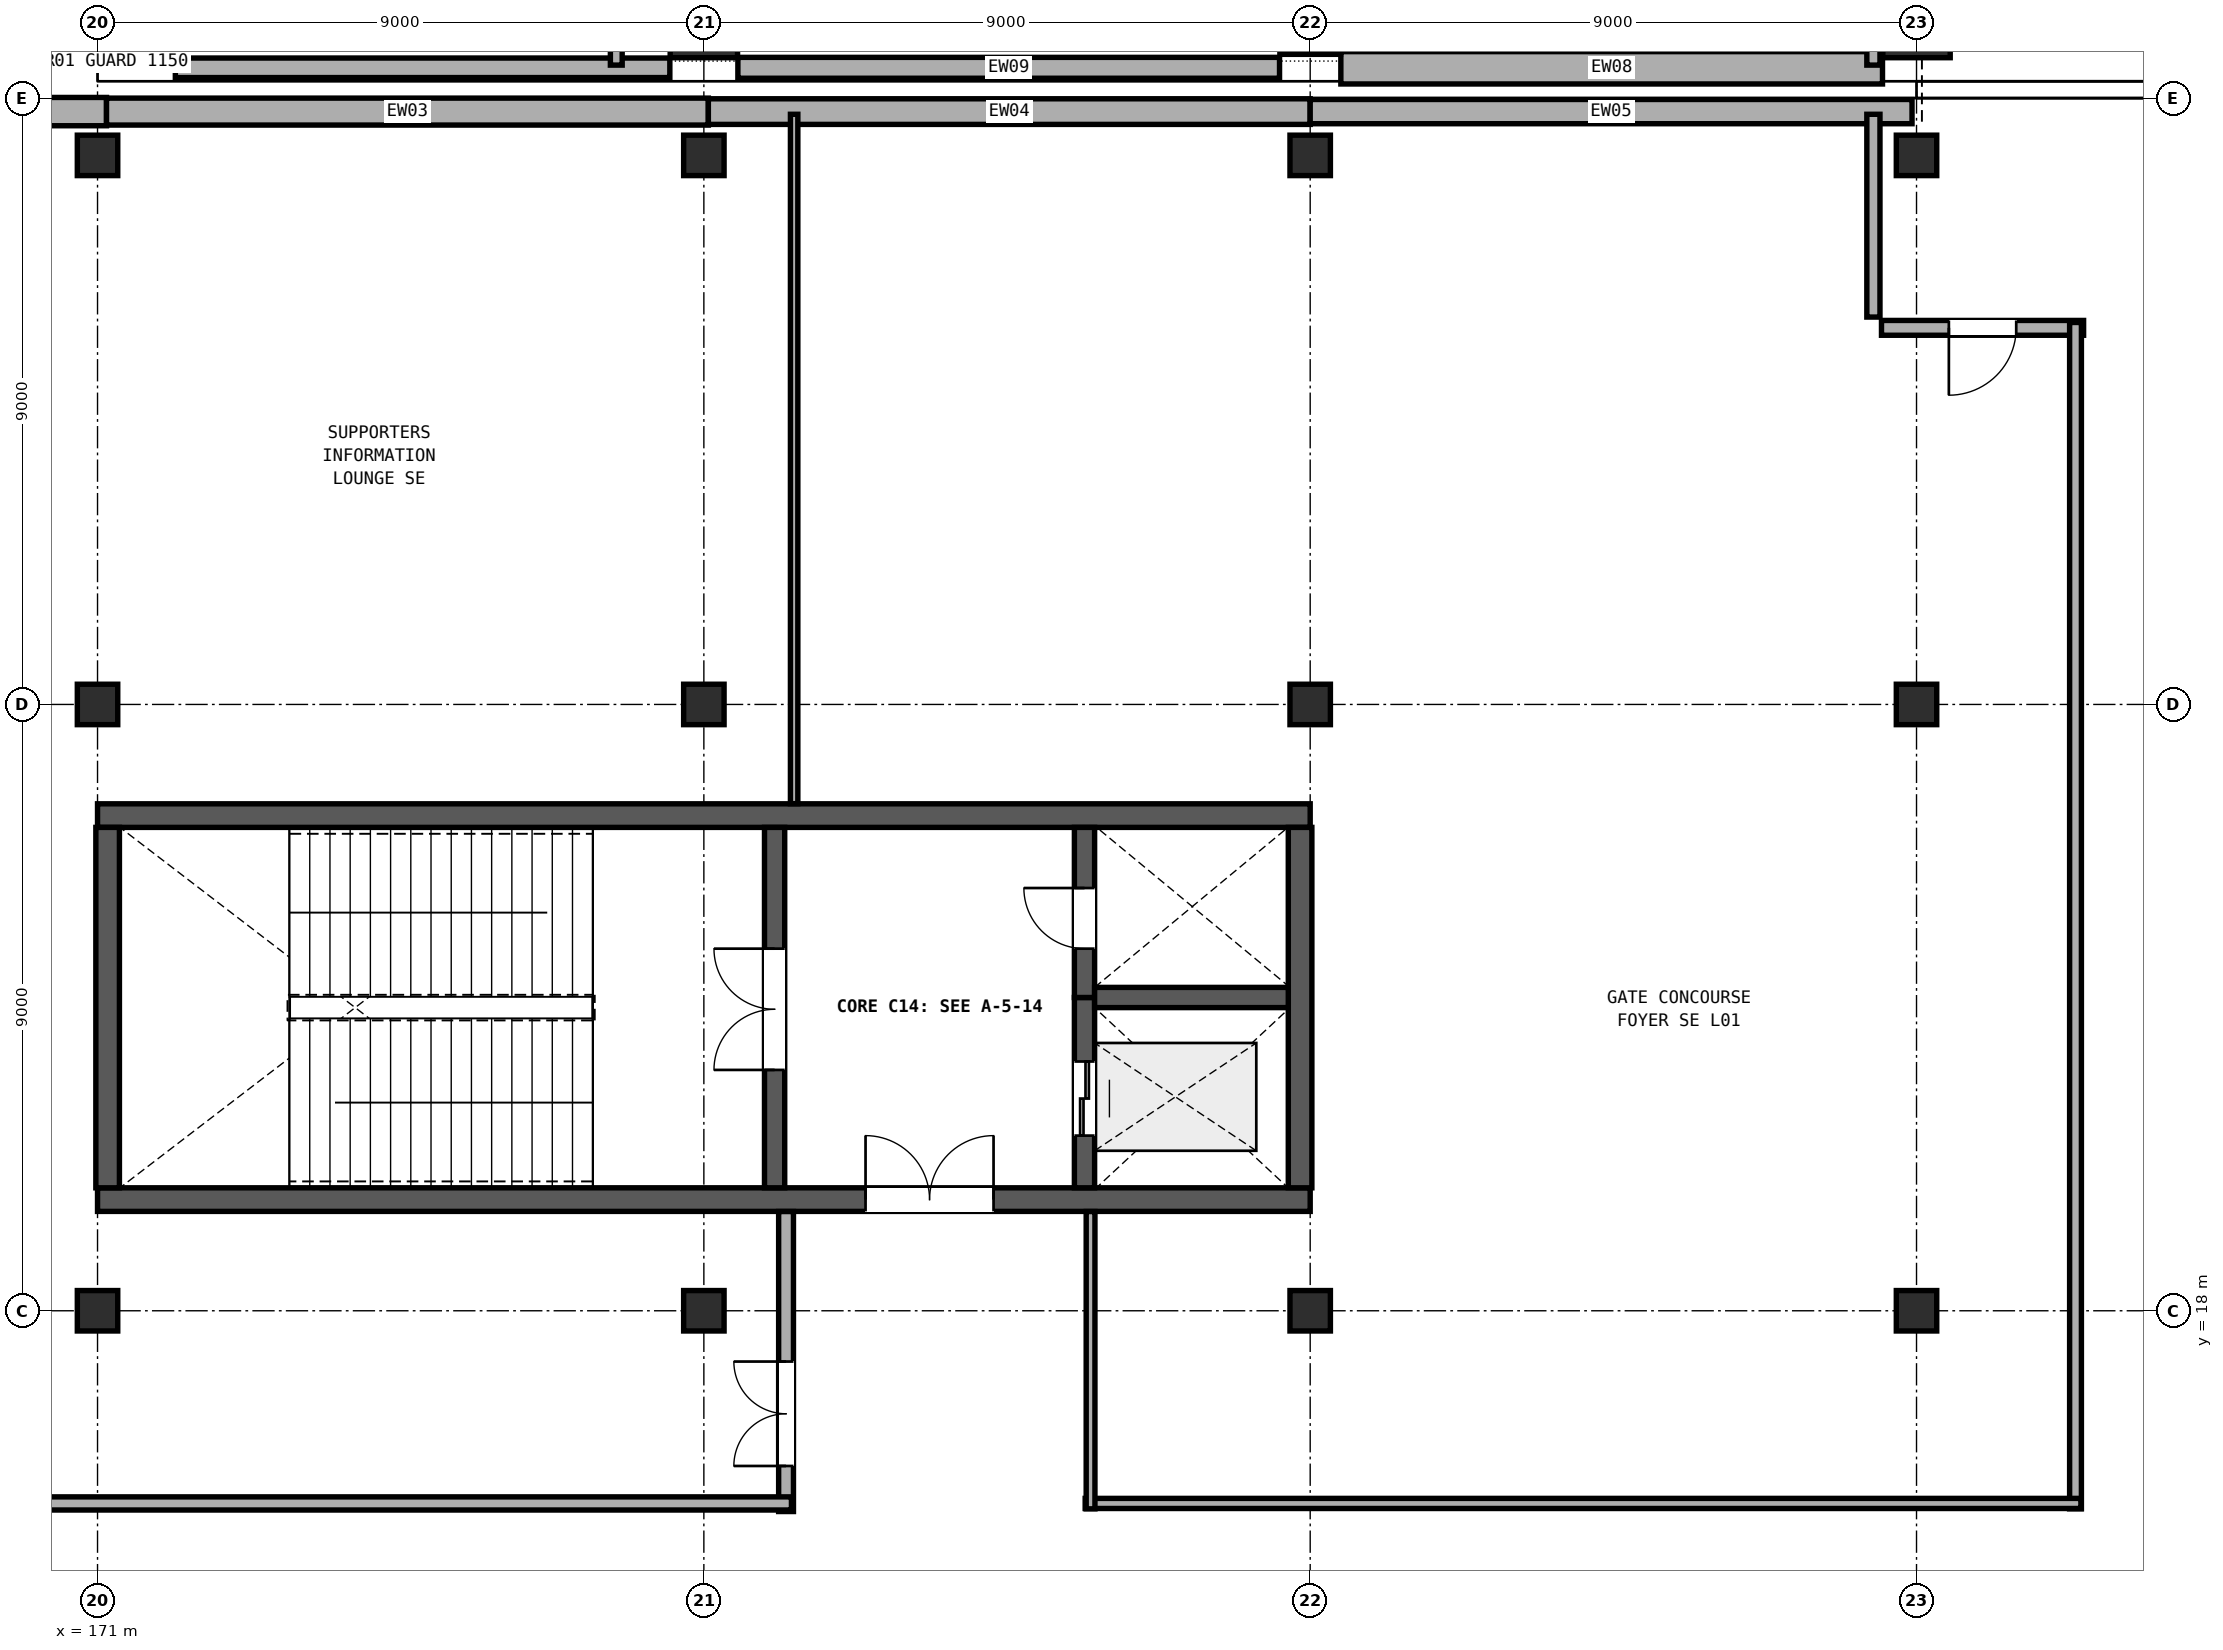
"""IFC4 building model, lengths in metres.
Left out: names, types, materials, properties, quantities, classifications, styles, units other than length and angle.
Written with IfcOpenShell. Run it as: python <this file> out.ifc"""

import sys

from ifc_helpers import new_model, si_unit, direction, frame, frame_2d, origin, origin_2d, place, context, subcontext, project, spatial, rectangle, extrude, element, fill, save


model = new_model("IFC4")
c1 = context("Model", 3, precision=1e-05, world=origin(), true_north=direction((0.0, 1.0)))
c2 = subcontext(c1, "Body", "Model", "MODEL_VIEW")
j1 = project(units=[si_unit("LENGTHUNIT", "METRE"), si_unit("PLANEANGLEUNIT", "RADIAN")], contexts=[c1])
p1 = place(None, origin())
s1 = spatial("IfcSite", under=j1, at=p1, CompositionType="ELEMENT")
p2 = place(p1, origin())
s2 = spatial("IfcBuilding", under=s1, at=p2, CompositionType="ELEMENT")
p3 = place(p2, frame((0.0, 0.0, 4.8)))
s3 = spatial("IfcBuildingStorey", under=s2, at=p3, CompositionType="ELEMENT", Elevation=4.8)
p4 = place(p3, frame((171.7, 37.1, 0.0), z_axis=(0.0, 0.0, 1.0), x_axis=(1.0, 0.0, 0.0)))
e1 = element("IfcColumn", 1, at=p4, inside=s3, PredefinedType="COLUMN", context=c2, shape_type="SweptSolid", body=[
    extrude(rectangle(XDim=0.9, YDim=0.9, at=origin_2d()), origin(), (0.0, 0.0, 1.0), 4.8),
])
p5 = place(p3, frame((180.0, 37.1, 0.0), z_axis=(0.0, 0.0, 1.0), x_axis=(1.0, 0.0, 0.0)))
e2 = element("IfcColumn", 2, at=p5, inside=s3, PredefinedType="COLUMN", context=c2, shape_type="SweptSolid", body=[
    extrude(rectangle(XDim=1.0, YDim=1.0, at=origin_2d()), origin(), (0.0, 0.0, 1.0), 4.8),
])
p6 = place(p3, frame((189.0, 37.1, 0.0), z_axis=(0.0, 0.0, 1.0), x_axis=(1.0, 0.0, 0.0)))
e3 = element("IfcColumn", 3, at=p6, inside=s3, PredefinedType="COLUMN", context=c2, shape_type="SweptSolid", body=[
    extrude(rectangle(XDim=0.9, YDim=0.9, at=origin_2d()), origin(), (0.0, 0.0, 1.0), 4.8),
])
p7 = place(p3, frame((198.0, 37.1, 0.0), z_axis=(0.0, 0.0, 1.0), x_axis=(1.0, 0.0, 0.0)))
e4 = element("IfcColumn", 4, at=p7, inside=s3, PredefinedType="COLUMN", context=c2, shape_type="SweptSolid", body=[
    extrude(rectangle(XDim=1.0, YDim=1.0, at=origin_2d()), origin(), (0.0, 0.0, 1.0), 4.8),
])
for number, where, z_axis, x_axis in (
    (5, (171.0, 18.0, 0.0), (0.0, 0.0, 1.0), (1.0, 0.0, 0.0)),
    (6, (171.0, 27.0, 0.0), (0.0, 0.0, 1.0), (1.0, 0.0, 0.0)),
    (7, (171.0, 35.15, 0.0), (0.0, 0.0, 1.0), (1.0, 0.0, 0.0)),
    (8, (180.0, 18.0, 0.0), (0.0, 0.0, 1.0), (1.0, 0.0, 0.0)),
    (9, (180.0, 27.0, 0.0), (0.0, 0.0, 1.0), (1.0, 0.0, 0.0)),
    (10, (180.0, 35.15, 0.0), (0.0, 0.0, 1.0), (1.0, 0.0, 0.0)),
    (11, (189.0, 18.0, 0.0), (0.0, 0.0, 1.0), (1.0, 0.0, 0.0)),
    (12, (189.0, 27.0, 0.0), (0.0, 0.0, 1.0), (1.0, 0.0, 0.0)),
    (13, (189.0, 35.15, 0.0), (0.0, 0.0, 1.0), (1.0, 0.0, 0.0)),
    (14, (198.0, 18.0, 0.0), (0.0, 0.0, 1.0), (1.0, 0.0, 0.0)),
    (15, (198.0, 27.0, 0.0), (0.0, 0.0, 1.0), (1.0, 0.0, 0.0)),
    (16, (198.0, 35.15, 0.0), (0.0, 0.0, 1.0), (1.0, 0.0, 0.0)),
):
    element("IfcColumn", number, at=place(p3, frame(where, z_axis=z_axis, x_axis=x_axis)), inside=s3, PredefinedType="COLUMN", context=c2, shape_type="SweptSolid", body=[
        extrude(rectangle(XDim=0.6, YDim=0.6, at=origin_2d()), origin(), (0.0, 0.0, 1.0), 4.8),
    ])
p8 = place(p3, frame((171.0, 19.65, 0.0), z_axis=(0.0, 0.0, 1.0), x_axis=(1.0, 0.0, 0.0)))
e17 = element("IfcWall", 17, at=p8, inside=s3, PredefinedType="SHEAR", context=c2, shape_type="SweptSolid", body=[
    extrude(rectangle(XDim=18.0, YDim=0.35, at=frame_2d((9.0, 0.0))), origin(), (0.0, 0.0, 1.0), 4.565),
])
p9 = place(p8, frame((11.4, 0.0, 0.0)))
e18 = element("IfcOpeningElement", 18, at=p9, cuts=e17, PredefinedType="OPENING", context=c2, shape_type="SweptSolid", body=[
    extrude(rectangle(XDim=1.9, YDim=2.25, at=frame_2d((0.95, 1.125))), frame((0.0, 0.185, 0.0), z_axis=(0.0, -1.0, 0.0), x_axis=(1.0, 0.0, 0.0)), (0.0, 0.0, 1.0), 0.37),
])
p10 = place(p3, frame((189.0, 25.35, 0.0), z_axis=(0.0, 0.0, 1.0), x_axis=(-1.0, 0.0, 0.0)))
e19 = element("IfcWall", 19, at=p10, inside=s3, PredefinedType="SHEAR", context=c2, shape_type="SweptSolid", body=[
    extrude(rectangle(XDim=18.0, YDim=0.35, at=frame_2d((9.0, 0.0))), origin(), (0.0, 0.0, 1.0), 4.565),
])
for number, where, z_axis, x_axis in (
    (20, (171.15, 25.175, 0.0), (0.0, 0.0, 1.0), (0.0, -1.0, 0.0)),
    (21, (188.85, 19.825, 0.0), (0.0, 0.0, 1.0), (0.0, 1.0, 0.0)),
):
    element("IfcWall", number, at=place(p3, frame(where, z_axis=z_axis, x_axis=x_axis)), inside=s3, PredefinedType="SHEAR", context=c2, shape_type="SweptSolid", body=[
        extrude(rectangle(XDim=5.35, YDim=0.35, at=frame_2d((2.675, 0.0))), origin(), (0.0, 0.0, 1.0), 4.565),
    ])
p11 = place(p3, frame((181.05, 19.825, 0.0), z_axis=(0.0, 0.0, 1.0), x_axis=(0.0, 1.0, 0.0)))
e22 = element("IfcWall", 22, at=p11, inside=s3, PredefinedType="SHEAR", context=c2, shape_type="SweptSolid", body=[
    extrude(rectangle(XDim=5.35, YDim=0.3, at=frame_2d((2.675, 0.0))), origin(), (0.0, 0.0, 1.0), 4.565),
])
p12 = place(p11, frame((1.75, 0.0, 0.0)))
e23 = element("IfcOpeningElement", 23, at=p12, cuts=e22, PredefinedType="OPENING", context=c2, shape_type="SweptSolid", body=[
    extrude(rectangle(XDim=1.8, YDim=2.25, at=frame_2d((0.9, 1.125))), frame((0.0, 0.16, 0.0), z_axis=(0.0, -1.0, 0.0), x_axis=(1.0, 0.0, 0.0)), (0.0, 0.0, 1.0), 0.32),
])
p13 = place(p3, frame((185.65, 19.825, 0.0), z_axis=(0.0, 0.0, 1.0), x_axis=(0.0, 1.0, 0.0)))
e24 = element("IfcWall", 24, at=p13, inside=s3, PredefinedType="SHEAR", context=c2, shape_type="SweptSolid", body=[
    extrude(rectangle(XDim=2.825, YDim=0.3, at=frame_2d((1.413, 0.0))), origin(), (0.0, 0.0, 1.0), 4.565),
])
p14 = place(p13, frame((0.775, 0.0, 0.0)))
e25 = element("IfcOpeningElement", 25, at=p14, cuts=e24, PredefinedType="OPENING", context=c2, shape_type="SweptSolid", body=[
    extrude(rectangle(XDim=1.1, YDim=2.1, at=frame_2d((0.55, 1.05))), frame((0.0, 0.16, 0.0), z_axis=(0.0, -1.0, 0.0), x_axis=(1.0, 0.0, 0.0)), (0.0, 0.0, 1.0), 0.32),
])
p15 = place(p3, frame((185.65, 22.65, 0.0), z_axis=(0.0, 0.0, 1.0), x_axis=(0.0, 1.0, 0.0)))
e26 = element("IfcWall", 26, at=p15, inside=s3, PredefinedType="SHEAR", context=c2, shape_type="SweptSolid", body=[
    extrude(rectangle(XDim=2.525, YDim=0.3, at=frame_2d((1.263, 0.0))), origin(), (0.0, 0.0, 1.0), 4.565),
])
p16 = place(p15, frame((0.725, 0.0, 0.0)))
e27 = element("IfcOpeningElement", 27, at=p16, cuts=e26, PredefinedType="OPENING", context=c2, shape_type="SweptSolid", body=[
    extrude(rectangle(XDim=0.9, YDim=2.1, at=frame_2d((0.45, 1.05))), frame((0.0, 0.16, 0.0), z_axis=(0.0, -1.0, 0.0), x_axis=(1.0, 0.0, 0.0)), (0.0, 0.0, 1.0), 0.32),
])
p17 = place(p3, frame((185.8, 22.65, 0.0), z_axis=(0.0, 0.0, 1.0), x_axis=(1.0, 0.0, 0.0)))
e28 = element("IfcWall", 28, at=p17, inside=s3, PredefinedType="SHEAR", context=c2, shape_type="SweptSolid", body=[
    extrude(rectangle(XDim=2.875, YDim=0.3, at=frame_2d((1.438, 0.0))), origin(), (0.0, 0.0, 1.0), 4.565),
])
p18 = place(p3, frame((197.495, 36.45, 0.0), z_axis=(0.0, 0.0, 1.0), x_axis=(-1.0, 0.0, 0.0)))
e29 = element("IfcWall", 29, at=p18, inside=s3, PredefinedType="SOLIDWALL", context=c2, shape_type="SweptSolid", body=[
    extrude(rectangle(XDim=8.04, YDim=0.48, at=frame_2d((4.02, 0.0))), origin(), (0.0, 0.0, 1.0), 3.28),
])
p19 = place(p3, frame((188.545, 36.45, 0.0), z_axis=(0.0, 0.0, 1.0), x_axis=(-1.0, 0.0, 0.0)))
e30 = element("IfcWall", 30, at=p19, inside=s3, PredefinedType="SOLIDWALL", context=c2, shape_type="SweptSolid", body=[
    extrude(rectangle(XDim=8.04, YDim=0.31, at=frame_2d((4.02, 0.0))), origin(), (0.0, 0.0, 1.0), 3.28),
])
p20 = place(p3, frame((179.495, 36.45, 0.0), z_axis=(0.0, 0.0, 1.0), x_axis=(-1.0, 0.0, 0.0)))
e31 = element("IfcWall", 31, at=p20, inside=s3, PredefinedType="SOLIDWALL", context=c2, shape_type="SweptSolid", body=[
    extrude(rectangle(XDim=7.34, YDim=0.29, at=frame_2d((3.67, 0.0))), origin(), (0.0, 0.0, 1.0), 3.28),
])
p21 = place(p3, frame((162.2, 35.8, 0.0), z_axis=(0.0, 0.0, 1.0), x_axis=(1.0, 0.0, 0.0)))
e32 = element("IfcWall", 32, at=p21, inside=s3, PredefinedType="SOLIDWALL", context=c2, shape_type="SweptSolid", body=[
    extrude(rectangle(XDim=8.933, YDim=0.42, at=frame_2d((4.467, 0.0))), origin(), (0.0, 0.0, 1.0), 3.28),
])
p22 = place(p3, frame((171.133, 35.8, 0.0), z_axis=(0.0, 0.0, 1.0), x_axis=(1.0, 0.0, 0.0)))
e33 = element("IfcWall", 33, at=p22, inside=s3, PredefinedType="SOLIDWALL", context=c2, shape_type="SweptSolid", body=[
    extrude(rectangle(XDim=8.933, YDim=0.4, at=frame_2d((4.467, 0.0))), origin(), (0.0, 0.0, 1.0), 3.28),
])
p23 = place(p3, frame((180.067, 35.8, 0.0), z_axis=(0.0, 0.0, 1.0), x_axis=(1.0, 0.0, 0.0)))
e34 = element("IfcWall", 34, at=p23, inside=s3, PredefinedType="SOLIDWALL", context=c2, shape_type="SweptSolid", body=[
    extrude(rectangle(XDim=8.933, YDim=0.38, at=frame_2d((4.467, 0.0))), origin(), (0.0, 0.0, 1.0), 3.28),
])
p24 = place(p3, frame((189.0, 35.8, 0.0), z_axis=(0.0, 0.0, 1.0), x_axis=(1.0, 0.0, 0.0)))
e35 = element("IfcWall", 35, at=p24, inside=s3, PredefinedType="SOLIDWALL", context=c2, shape_type="SweptSolid", body=[
    extrude(rectangle(XDim=8.933, YDim=0.36, at=frame_2d((4.467, 0.0))), origin(), (0.0, 0.0, 1.0), 3.28),
])
p25 = place(p3, frame((197.36, 39.5, 0.0), z_axis=(0.0, 0.0, 1.0), x_axis=(0.0, -1.0, 0.0)))
e36 = element("IfcWall", 36, at=p25, inside=s3, PredefinedType="PARTITIONING", context=c2, shape_type="SweptSolid", body=[
    extrude(rectangle(XDim=3.01, YDim=0.195, at=frame_2d((1.505, 0.0))), origin(), (0.0, 0.0, 1.0), 3.28),
])
p26 = place(p3, frame((178.7, 36.49, 0.0), z_axis=(0.0, 0.0, 1.0), x_axis=(0.0, 1.0, 0.0)))
e37 = element("IfcWall", 37, at=p26, inside=s3, PredefinedType="PARTITIONING", context=c2, shape_type="SweptSolid", body=[
    extrude(rectangle(XDim=10.39, YDim=0.175, at=frame_2d((5.195, 0.0))), origin(), (0.0, 0.0, 1.0), 3.28),
])
p27 = place(p3, frame((200.48, 32.59, 0.0), z_axis=(0.0, 0.0, 1.0), x_axis=(-1.0, 0.0, 0.0)))
e38 = element("IfcWall", 38, at=p27, inside=s3, PredefinedType="PARTITIONING", context=c2, shape_type="SweptSolid", body=[
    extrude(rectangle(XDim=3.0, YDim=0.22, at=frame_2d((1.5, 0.0))), origin(), (0.0, 0.0, 1.0), 3.28),
])
p28 = place(p27, frame((1.0, 0.0, 0.0)))
e39 = element("IfcOpeningElement", 39, at=p28, cuts=e38, PredefinedType="OPENING", context=c2, shape_type="SweptSolid", body=[
    extrude(rectangle(XDim=1.0, YDim=2.1, at=frame_2d((0.5, 1.05))), frame((0.0, 0.12, 0.0), z_axis=(0.0, -1.0, 0.0), x_axis=(1.0, 0.0, 0.0)), (0.0, 0.0, 1.0), 0.24),
])
p29 = place(p3, frame((197.36, 35.76, 0.0), z_axis=(0.0, 0.0, 1.0), x_axis=(0.0, -1.0, 0.0)))
e40 = element("IfcWall", 40, at=p29, inside=s3, PredefinedType="PARTITIONING", context=c2, shape_type="SweptSolid", body=[
    extrude(rectangle(XDim=3.01, YDim=0.195, at=frame_2d((1.505, 0.0))), origin(), (0.0, 0.0, 1.0), 3.28),
])
p30 = place(p3, frame((200.36, 32.67, 0.0), z_axis=(0.0, 0.0, 1.0), x_axis=(0.0, -1.0, 0.0)))
e41 = element("IfcWall", 41, at=p30, inside=s3, PredefinedType="PARTITIONING", context=c2, shape_type="SweptSolid", body=[
    extrude(rectangle(XDim=17.61, YDim=0.175, at=frame_2d((8.805, 0.0))), origin(), (0.0, 0.0, 1.0), 3.28),
])
p31 = place(p3, frame((200.44, 15.14, 0.0), z_axis=(0.0, 0.0, 1.0), x_axis=(-1.0, 0.0, 0.0)))
e42 = element("IfcWall", 42, at=p31, inside=s3, PredefinedType="PARTITIONING", context=c2, shape_type="SweptSolid", body=[
    extrude(rectangle(XDim=14.78, YDim=0.15, at=frame_2d((7.39, 0.0))), origin(), (0.0, 0.0, 1.0), 3.28),
])
p32 = place(p3, frame((185.74, 15.06, 0.0), z_axis=(0.0, 0.0, 1.0), x_axis=(0.0, 1.0, 0.0)))
e43 = element("IfcWall", 43, at=p32, inside=s3, PredefinedType="PARTITIONING", context=c2, shape_type="SweptSolid", body=[
    extrude(rectangle(XDim=4.413, YDim=0.13, at=frame_2d((2.207, 0.0))), origin(), (0.0, 0.0, 1.0), 3.28),
])
p33 = place(p3, frame((181.34, 25.527, 0.0), z_axis=(0.0, 0.0, 1.0), x_axis=(0.0, 1.0, 0.0)))
e44 = element("IfcWall", 44, at=p33, inside=s3, PredefinedType="PARTITIONING", context=c2, shape_type="SweptSolid", body=[
    extrude(rectangle(XDim=10.233, YDim=0.11, at=frame_2d((5.116, 0.0))), origin(), (0.0, 0.0, 1.0), 3.28),
])
p34 = place(p3, frame((181.22, 15.02, 0.0), z_axis=(0.0, 0.0, 1.0), x_axis=(0.0, 1.0, 0.0)))
e45 = element("IfcWall", 45, at=p34, inside=s3, PredefinedType="PARTITIONING", context=c2, shape_type="SweptSolid", body=[
    extrude(rectangle(XDim=4.453, YDim=0.22, at=frame_2d((2.227, 0.0))), origin(), (0.0, 0.0, 1.0), 3.28),
])
p35 = place(p34, frame((0.676, 0.0, 0.0)))
e46 = element("IfcOpeningElement", 46, at=p35, cuts=e45, PredefinedType="OPENING", context=c2, shape_type="SweptSolid", body=[
    extrude(rectangle(XDim=1.55, YDim=2.2, at=frame_2d((0.775, 1.1))), frame((0.0, 0.12, 0.0), z_axis=(0.0, -1.0, 0.0), x_axis=(1.0, 0.0, 0.0)), (0.0, 0.0, 1.0), 0.24),
])
p36 = place(p3, frame((181.3, 15.14, 0.0), z_axis=(0.0, 0.0, 1.0), x_axis=(-1.0, 0.0, 0.0)))
e47 = element("IfcWall", 47, at=p36, inside=s3, PredefinedType="PARTITIONING", context=c2, shape_type="SweptSolid", body=[
    extrude(rectangle(XDim=15.97, YDim=0.195, at=frame_2d((7.985, 0.0))), origin(), (0.0, 0.0, 1.0), 3.28),
])
p37 = place(p12, origin())
e48 = element("IfcDoor", 48, at=p37, inside=s3, OperationType="DOUBLE_DOOR_SINGLE_SWING", PredefinedType="DOOR", context=c2, shape_type="SweptSolid", body=[
    extrude(rectangle(XDim=1.8, YDim=2.25, at=frame_2d((0.9, 1.125))), frame((0.0, 0.025, 0.0), z_axis=(0.0, -1.0, 0.0), x_axis=(1.0, 0.0, 0.0)), (0.0, 0.0, 1.0), 0.05),
])
fill(e23, e48)
p38 = place(p16, origin())
e49 = element("IfcDoor", 49, at=p38, inside=s3, OperationType="SINGLE_SWING_RIGHT", PredefinedType="DOOR", context=c2, shape_type="SweptSolid", body=[
    extrude(rectangle(XDim=0.9, YDim=2.1, at=frame_2d((0.45, 1.05))), frame((0.0, 0.025, 0.0), z_axis=(0.0, -1.0, 0.0), x_axis=(1.0, 0.0, 0.0)), (0.0, 0.0, 1.0), 0.05),
])
fill(e27, e49)
p39 = place(p14, origin())
e50 = element("IfcDoor", 50, at=p39, inside=s3, OperationType="DOUBLE_DOOR_SLIDING", PredefinedType="DOOR", context=c2, shape_type="SweptSolid", body=[
    extrude(rectangle(XDim=1.1, YDim=2.1, at=frame_2d((0.55, 1.05))), frame((0.0, 0.025, 0.0), z_axis=(0.0, -1.0, 0.0), x_axis=(1.0, 0.0, 0.0)), (0.0, 0.0, 1.0), 0.05),
])
fill(e25, e50)
p40 = place(p9, origin())
e51 = element("IfcDoor", 51, at=p40, inside=s3, OperationType="DOUBLE_DOOR_SINGLE_SWING", PredefinedType="DOOR", context=c2, shape_type="SweptSolid", body=[
    extrude(rectangle(XDim=1.9, YDim=2.25, at=frame_2d((0.95, 1.125))), frame((0.0, 0.025, 0.0), z_axis=(0.0, -1.0, 0.0), x_axis=(1.0, 0.0, 0.0)), (0.0, 0.0, 1.0), 0.05),
])
fill(e18, e51)
p41 = place(p28, origin())
e52 = element("IfcDoor", 52, at=p41, inside=s3, OperationType="SINGLE_SWING_RIGHT", PredefinedType="DOOR", context=c2, shape_type="SweptSolid", body=[
    extrude(rectangle(XDim=1.0, YDim=2.1, at=frame_2d((0.5, 1.05))), frame((0.0, 0.025, 0.0), z_axis=(0.0, -1.0, 0.0), x_axis=(1.0, 0.0, 0.0)), (0.0, 0.0, 1.0), 0.05),
])
fill(e39, e52)
p42 = place(p35, origin())
e53 = element("IfcDoor", 53, at=p42, inside=s3, OperationType="DOUBLE_DOOR_SINGLE_SWING", PredefinedType="DOOR", context=c2, shape_type="SweptSolid", body=[
    extrude(rectangle(XDim=1.55, YDim=2.2, at=frame_2d((0.775, 1.1))), frame((0.0, 0.025, 0.0), z_axis=(0.0, -1.0, 0.0), x_axis=(1.0, 0.0, 0.0)), (0.0, 0.0, 1.0), 0.05),
])
fill(e46, e53)
save(model, sys.argv[1])
